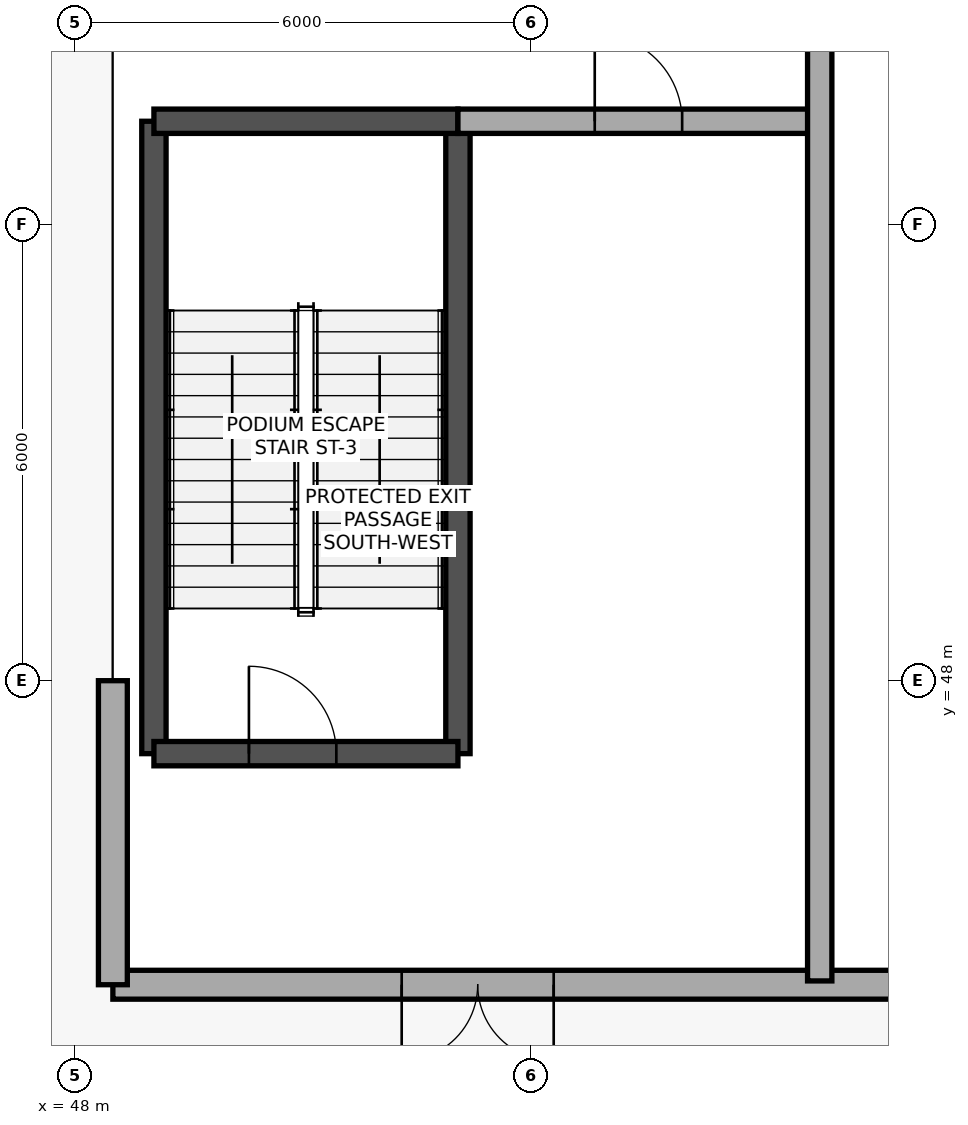
"""IFC4 building model, lengths in metres.
Left out: names, types, materials, properties, quantities, classifications, styles, units other than length and angle.
Written with IfcOpenShell. Run it as: python <this file> out.ifc"""

import sys

from ifc_helpers import new_model, si_unit, direction, frame, frame_2d, origin, place, context, subcontext, project, spatial, rectangle, extrude, element, fill, save


model = new_model("IFC4")
c1 = context("Model", 3, precision=1e-05, world=origin(), true_north=direction((0.0, 1.0)))
c2 = subcontext(c1, "Body", "Model", "MODEL_VIEW")
j1 = project(units=[si_unit("LENGTHUNIT", "METRE"), si_unit("PLANEANGLEUNIT", "RADIAN")], contexts=[c1])
p1 = place(None, origin())
s1 = spatial("IfcSite", under=j1, at=p1, CompositionType="ELEMENT")
p2 = place(p1, origin())
s2 = spatial("IfcBuilding", under=s1, at=p2, CompositionType="ELEMENT")
p3 = place(p2, origin())
s3 = spatial("IfcBuildingStorey", under=s2, at=p3, CompositionType="ELEMENT", Elevation=0.0)
for number, where, z_axis, x_axis in (
    (1, (49.04, 47.04, 0.0), (0.0, 0.0, 1.0), (0.0, 1.0, 0.0)),
    (2, (53.04, 47.04, 0.0), (0.0, 0.0, 1.0), (0.0, 1.0, 0.0)),
):
    element("IfcWall", number, at=place(p3, frame(where, z_axis=z_axis, x_axis=x_axis)), inside=s3, PredefinedType="SHEAR", context=c2, shape_type="SweptSolid", body=[
        extrude(rectangle(XDim=8.32, YDim=0.32, at=frame_2d((4.16, 0.0))), origin(), (0.0, 0.0, 1.0), 5.4),
    ])
p4 = place(p3, frame((49.04, 55.36, 0.0), z_axis=(0.0, 0.0, 1.0), x_axis=(1.0, 0.0, 0.0)))
e3 = element("IfcWall", 3, at=p4, inside=s3, PredefinedType="SHEAR", context=c2, shape_type="SweptSolid", body=[
    extrude(rectangle(XDim=4.0, YDim=0.32, at=frame_2d((2.0, 0.0))), origin(), (0.0, 0.0, 1.0), 5.4),
])
p5 = place(p3, frame((49.04, 47.04, 0.0), z_axis=(0.0, 0.0, 1.0), x_axis=(1.0, 0.0, 0.0)))
e4 = element("IfcWall", 4, at=p5, inside=s3, PredefinedType="SHEAR", context=c2, shape_type="SweptSolid", body=[
    extrude(rectangle(XDim=4.0, YDim=0.32, at=frame_2d((2.0, 0.0))), origin(), (0.0, 0.0, 1.0), 5.4),
])
p6 = place(p5, frame((1.25, 0.0, 0.0)))
e5 = element("IfcOpeningElement", 5, at=p6, cuts=e4, PredefinedType="OPENING", context=c2, shape_type="SweptSolid", body=[
    extrude(rectangle(XDim=1.15, YDim=2.15, at=frame_2d((0.575, 1.075))), frame((0.0, 0.17, 0.0), z_axis=(0.0, -1.0, 0.0), x_axis=(1.0, 0.0, 0.0)), (0.0, 0.0, 1.0), 0.34),
])
p7 = place(p3, frame((83.5, 44.0, 0.0), z_axis=(0.0, 0.0, 1.0), x_axis=(-1.0, 0.0, 0.0)))
e6 = element("IfcWall", 6, at=p7, inside=s3, PredefinedType="STANDARD", context=c2, shape_type="SweptSolid", body=[
    extrude(rectangle(XDim=35.0, YDim=0.38, at=frame_2d((17.5, 0.0))), origin(), (0.0, 0.0, 1.0), 4.08),
])
p8 = place(p7, frame((3.5, 0.0, 0.0)))
e7 = element("IfcOpeningElement", 7, at=p8, cuts=e6, PredefinedType="OPENING", context=c2, shape_type="SweptSolid", body=[
    extrude(rectangle(XDim=2.0, YDim=2.25, at=frame_2d((1.0, 1.125))), frame((0.0, 0.2, 0.0), z_axis=(0.0, -1.0, 0.0), x_axis=(1.0, 0.0, 0.0)), (0.0, 0.0, 1.0), 0.4),
])
p9 = place(p7, frame((10.35, 0.0, 0.0)))
e8 = element("IfcOpeningElement", 8, at=p9, cuts=e6, PredefinedType="OPENING", context=c2, shape_type="SweptSolid", body=[
    extrude(rectangle(XDim=2.0, YDim=2.25, at=frame_2d((1.0, 1.125))), frame((0.0, 0.2, 0.0), z_axis=(0.0, -1.0, 0.0), x_axis=(1.0, 0.0, 0.0)), (0.0, 0.0, 1.0), 0.4),
])
p10 = place(p7, frame((16.4, 0.0, 0.0)))
e9 = element("IfcOpeningElement", 9, at=p10, cuts=e6, PredefinedType="OPENING", context=c2, shape_type="SweptSolid", body=[
    extrude(rectangle(XDim=2.2, YDim=2.6, at=frame_2d((1.1, 1.3))), frame((0.0, 0.2, 0.0), z_axis=(0.0, -1.0, 0.0), x_axis=(1.0, 0.0, 0.0)), (0.0, 0.0, 1.0), 0.4),
])
p11 = place(p7, frame((22.65, 0.0, 0.0)))
e10 = element("IfcOpeningElement", 10, at=p11, cuts=e6, PredefinedType="OPENING", context=c2, shape_type="SweptSolid", body=[
    extrude(rectangle(XDim=2.0, YDim=2.25, at=frame_2d((1.0, 1.125))), frame((0.0, 0.2, 0.0), z_axis=(0.0, -1.0, 0.0), x_axis=(1.0, 0.0, 0.0)), (0.0, 0.0, 1.0), 0.4),
])
p12 = place(p7, frame((29.2, 0.0, 0.0)))
e11 = element("IfcOpeningElement", 11, at=p12, cuts=e6, PredefinedType="OPENING", context=c2, shape_type="SweptSolid", body=[
    extrude(rectangle(XDim=2.0, YDim=2.25, at=frame_2d((1.0, 1.125))), frame((0.0, 0.2, 0.0), z_axis=(0.0, -1.0, 0.0), x_axis=(1.0, 0.0, 0.0)), (0.0, 0.0, 1.0), 0.4),
])
p13 = place(p3, frame((48.5, 44.0, 0.0), z_axis=(0.0, 0.0, 1.0), x_axis=(0.0, 1.0, 0.0)))
e12 = element("IfcWall", 12, at=p13, inside=s3, PredefinedType="STANDARD", context=c2, shape_type="SweptSolid", body=[
    extrude(rectangle(XDim=4.0, YDim=0.38, at=frame_2d((2.0, 0.0))), origin(), (0.0, 0.0, 1.0), 4.03),
])
p14 = place(p3, frame((53.04, 55.36, 0.0), z_axis=(0.0, 0.0, 1.0), x_axis=(1.0, 0.0, 0.0)))
e13 = element("IfcWall", 13, at=p14, inside=s3, PredefinedType="STANDARD", context=c2, shape_type="SweptSolid", body=[
    extrude(rectangle(XDim=4.76, YDim=0.32, at=frame_2d((2.38, 0.0))), origin(), (0.0, 0.0, 1.0), 4.08),
])
p15 = place(p14, frame((1.8, 0.0, 0.0)))
e14 = element("IfcOpeningElement", 14, at=p15, cuts=e13, PredefinedType="OPENING", context=c2, shape_type="SweptSolid", body=[
    extrude(rectangle(XDim=1.15, YDim=2.15, at=frame_2d((0.575, 1.075))), frame((0.0, 0.17, 0.0), z_axis=(0.0, -1.0, 0.0), x_axis=(1.0, 0.0, 0.0)), (0.0, 0.0, 1.0), 0.34),
])
p16 = place(p3, frame((57.8, 44.05, 0.0), z_axis=(0.0, 0.0, 1.0), x_axis=(0.0, 1.0, 0.0)))
e15 = element("IfcWall", 15, at=p16, inside=s3, PredefinedType="STANDARD", context=c2, shape_type="SweptSolid", body=[
    extrude(rectangle(XDim=16.75, YDim=0.32, at=frame_2d((8.375, 0.0))), origin(), (0.0, 0.0, 1.0), 4.08),
])
p17 = place(p16, frame((12.8, 0.0, 0.0)))
e16 = element("IfcOpeningElement", 16, at=p17, cuts=e15, PredefinedType="OPENING", context=c2, shape_type="SweptSolid", body=[
    extrude(rectangle(XDim=1.15, YDim=2.15, at=frame_2d((0.575, 1.075))), frame((0.0, 0.17, 0.0), z_axis=(0.0, -1.0, 0.0), x_axis=(1.0, 0.0, 0.0)), (0.0, 0.0, 1.0), 0.34),
])
p18 = place(p12, origin())
e17 = element("IfcDoor", 17, at=p18, inside=s3, OperationType="DOUBLE_DOOR_SINGLE_SWING", PredefinedType="DOOR", context=c2, shape_type="SweptSolid", body=[
    extrude(rectangle(XDim=2.0, YDim=2.25, at=frame_2d((1.0, 1.125))), frame((0.0, 0.025, 0.0), z_axis=(0.0, -1.0, 0.0), x_axis=(1.0, 0.0, 0.0)), (0.0, 0.0, 1.0), 0.05),
])
fill(e11, e17)
p19 = place(p6, origin())
e18 = element("IfcDoor", 18, at=p19, inside=s3, OperationType="SINGLE_SWING_LEFT", PredefinedType="DOOR", context=c2, shape_type="SweptSolid", body=[
    extrude(rectangle(XDim=1.15, YDim=2.15, at=frame_2d((0.575, 1.075))), frame((0.0, 0.025, 0.0), z_axis=(0.0, -1.0, 0.0), x_axis=(1.0, 0.0, 0.0)), (0.0, 0.0, 1.0), 0.05),
])
fill(e5, e18)
p20 = place(p15, origin())
e19 = element("IfcDoor", 19, at=p20, inside=s3, OperationType="SINGLE_SWING_LEFT", PredefinedType="DOOR", context=c2, shape_type="SweptSolid", body=[
    extrude(rectangle(XDim=1.15, YDim=2.15, at=frame_2d((0.575, 1.075))), frame((0.0, 0.025, 0.0), z_axis=(0.0, -1.0, 0.0), x_axis=(1.0, 0.0, 0.0)), (0.0, 0.0, 1.0), 0.05),
])
fill(e14, e19)
save(model, sys.argv[1])
